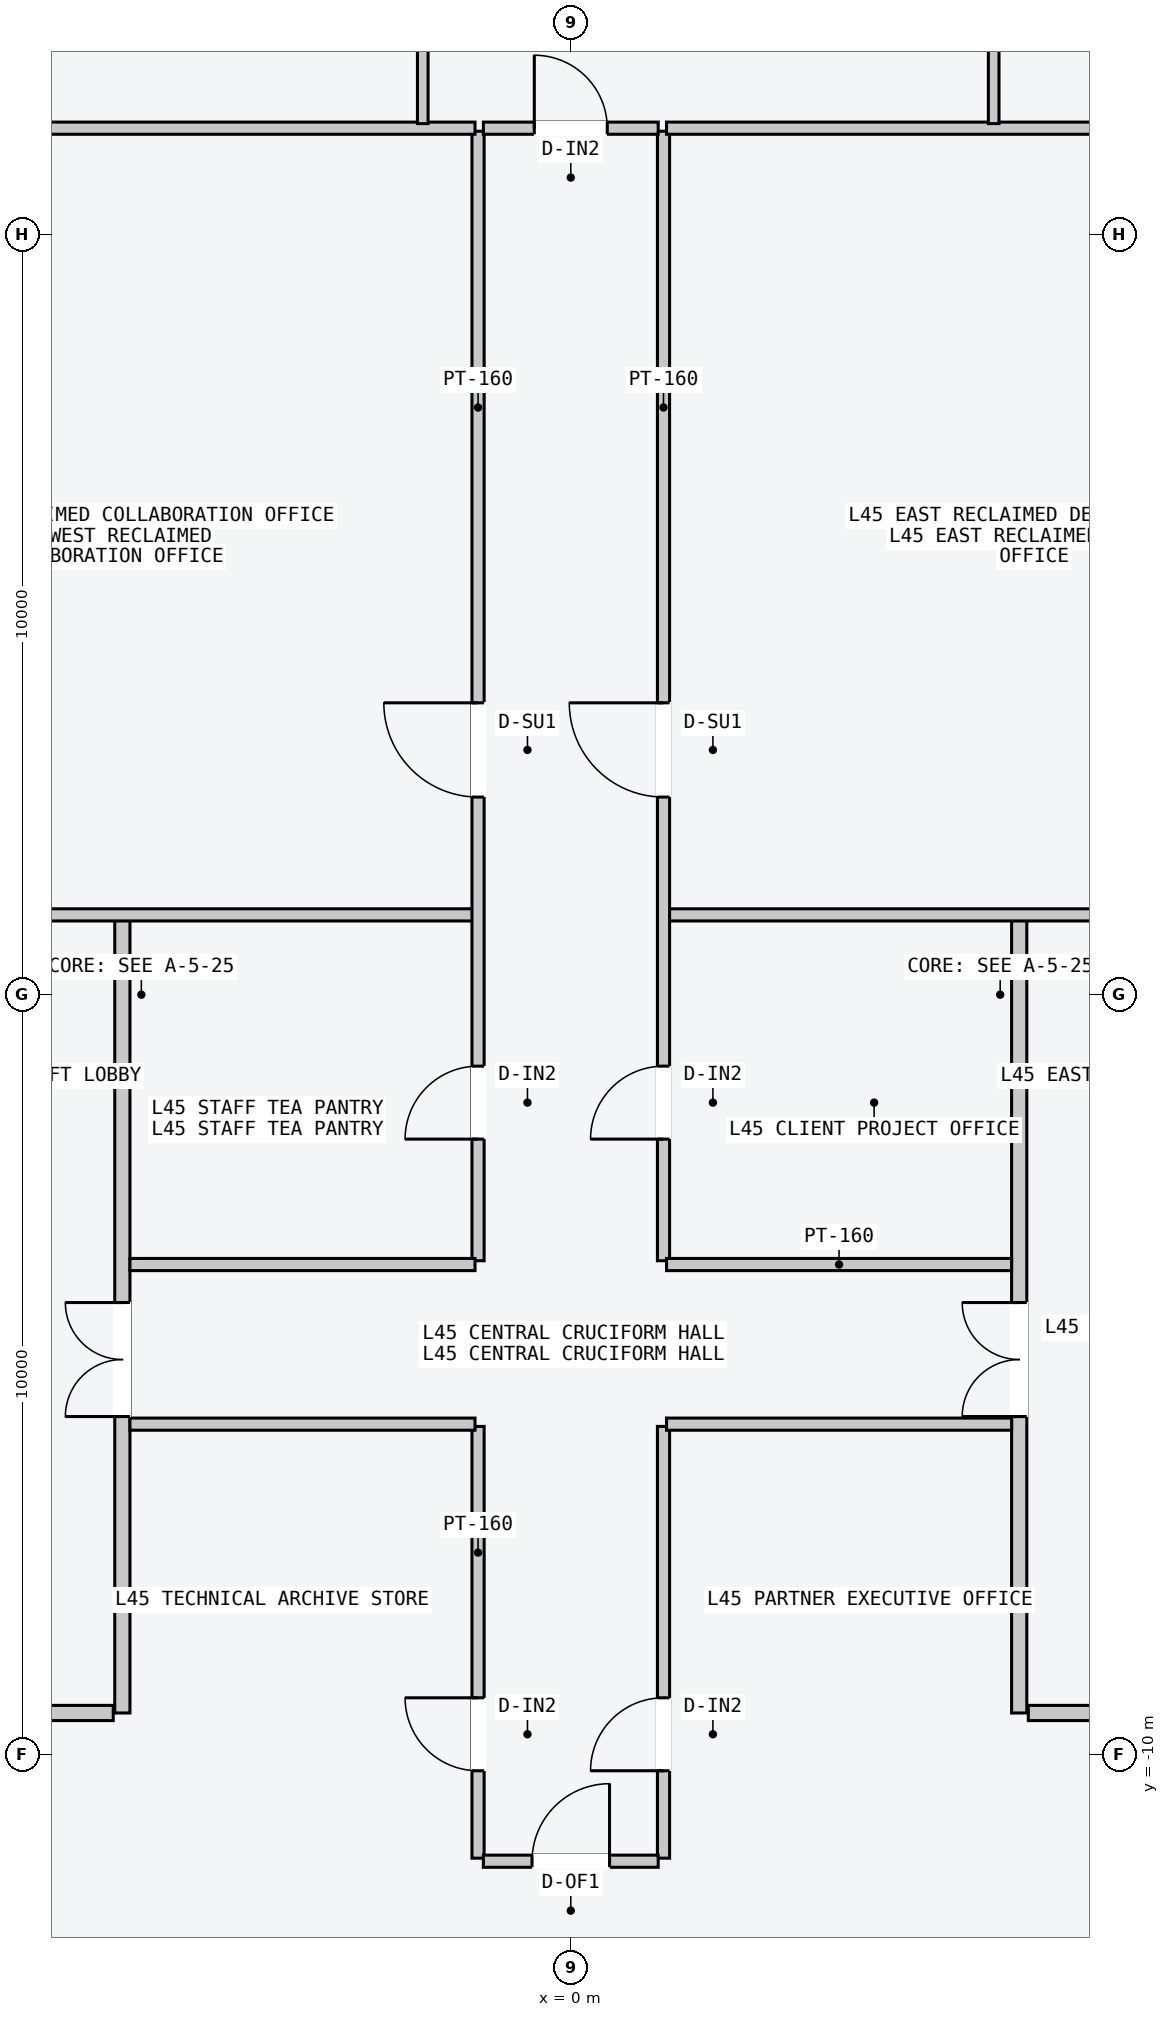
"""IFC4 building model, lengths in metres.
Left out: names, types, materials, properties, quantities, classifications, styles, units other than length and angle.
Written with IfcOpenShell. Run it as: python <this file> out.ifc"""

import sys

from ifc_helpers import new_model, si_unit, direction, frame, frame_2d, origin, place, context, subcontext, project, spatial, rectangle, extrude, element, fill, save


model = new_model("IFC4")
c1 = context("Model", 3, precision=1e-05, world=origin(), true_north=direction((0.0, 1.0)))
c2 = subcontext(c1, "Body", "Model", "MODEL_VIEW")
j1 = project(units=[si_unit("LENGTHUNIT", "METRE"), si_unit("PLANEANGLEUNIT", "RADIAN")], contexts=[c1])
p1 = place(None, origin())
s1 = spatial("IfcSite", under=j1, at=p1, CompositionType="ELEMENT")
p2 = place(p1, origin())
s2 = spatial("IfcBuilding", under=s1, at=p2, CompositionType="ELEMENT")
p3 = place(p2, frame((0.0, 0.0, 173.1)))
s3 = spatial("IfcBuildingStorey", under=s2, at=p3, CompositionType="ELEMENT", Elevation=173.1)
p4 = place(p3, frame((-5.9, -9.45, 0.0), z_axis=(0.0, 0.0, 1.0), x_axis=(0.0, 1.0, 0.0)))
e1 = element("IfcWall", 1, at=p4, inside=s3, PredefinedType="PARTITIONING", context=c2, shape_type="SweptSolid", body=[
    extrude(rectangle(XDim=10.5, YDim=0.2, at=frame_2d((5.25, 0.0))), origin(), (0.0, 0.0, 1.0), 3.4),
])
p5 = place(p4, frame((3.9, 0.0, 0.0)))
e2 = element("IfcOpeningElement", 2, at=p5, cuts=e1, PredefinedType="OPENING", context=c2, shape_type="SweptSolid", body=[
    extrude(rectangle(XDim=1.5, YDim=2.2, at=frame_2d((0.75, 1.1))), frame((0.0, 0.11, 0.0), z_axis=(0.0, -1.0, 0.0), x_axis=(1.0, 0.0, 0.0)), (0.0, 0.0, 1.0), 0.22),
])
p6 = place(p3, frame((-6.02, -9.45, 0.0), z_axis=(0.0, 0.0, 1.0), x_axis=(-1.0, 0.0, 0.0)))
e3 = element("IfcWall", 3, at=p6, inside=s3, PredefinedType="PARTITIONING", context=c2, shape_type="SweptSolid", body=[
    extrude(rectangle(XDim=1.8, YDim=0.2, at=frame_2d((0.9, 0.0))), origin(), (0.0, 0.0, 1.0), 3.4),
])
p7 = place(p3, frame((5.9, -9.45, 0.0), z_axis=(0.0, 0.0, 1.0), x_axis=(0.0, 1.0, 0.0)))
e4 = element("IfcWall", 4, at=p7, inside=s3, PredefinedType="PARTITIONING", context=c2, shape_type="SweptSolid", body=[
    extrude(rectangle(XDim=10.5, YDim=0.2, at=frame_2d((5.25, 0.0))), origin(), (0.0, 0.0, 1.0), 3.4),
])
p8 = place(p7, frame((3.9, 0.0, 0.0)))
e5 = element("IfcOpeningElement", 5, at=p8, cuts=e4, PredefinedType="OPENING", context=c2, shape_type="SweptSolid", body=[
    extrude(rectangle(XDim=1.5, YDim=2.2, at=frame_2d((0.75, 1.1))), frame((0.0, 0.11, 0.0), z_axis=(0.0, -1.0, 0.0), x_axis=(1.0, 0.0, 0.0)), (0.0, 0.0, 1.0), 0.22),
])
p9 = place(p3, frame((6.02, -9.45, 0.0), z_axis=(0.0, 0.0, 1.0), x_axis=(1.0, 0.0, 0.0)))
e6 = element("IfcWall", 6, at=p9, inside=s3, PredefinedType="PARTITIONING", context=c2, shape_type="SweptSolid", body=[
    extrude(rectangle(XDim=1.8, YDim=0.2, at=frame_2d((0.9, 0.0))), origin(), (0.0, 0.0, 1.0), 3.4),
])
p10 = place(p3, frame((-10.05, 1.05, 0.0), z_axis=(0.0, 0.0, 1.0), x_axis=(1.0, 0.0, 0.0)))
e7 = element("IfcWall", 7, at=p10, inside=s3, PredefinedType="PARTITIONING", context=c2, shape_type="SweptSolid", body=[
    extrude(rectangle(XDim=8.79, YDim=0.16, at=frame_2d((4.395, 0.0))), origin(), (0.0, 0.0, 1.0), 3.4),
])
p11 = place(p3, frame((-1.22, -3.5, 0.0), z_axis=(0.0, 0.0, 1.0), x_axis=(0.0, 1.0, 0.0)))
e8 = element("IfcWall", 8, at=p11, inside=s3, PredefinedType="PARTITIONING", context=c2, shape_type="SweptSolid", body=[
    extrude(rectangle(XDim=14.86, YDim=0.16, at=frame_2d((7.43, 0.0))), origin(), (0.0, 0.0, 1.0), 3.4),
])
p12 = place(p11, frame((6.1, 0.0, 0.0)))
e9 = element("IfcOpeningElement", 9, at=p12, cuts=e8, PredefinedType="OPENING", context=c2, shape_type="SweptSolid", body=[
    extrude(rectangle(XDim=1.24, YDim=2.24, at=frame_2d((0.62, 1.12))), frame((0.0, 0.09, 0.0), z_axis=(0.0, -1.0, 0.0), x_axis=(1.0, 0.0, 0.0)), (0.0, 0.0, 1.0), 0.18),
])
p13 = place(p11, frame((1.6, 0.0, 0.0)))
e10 = element("IfcOpeningElement", 10, at=p13, cuts=e8, PredefinedType="OPENING", context=c2, shape_type="SweptSolid", body=[
    extrude(rectangle(XDim=0.96, YDim=2.18, at=frame_2d((0.48, 1.09))), frame((0.0, 0.09, 0.0), z_axis=(0.0, -1.0, 0.0), x_axis=(1.0, 0.0, 0.0)), (0.0, 0.0, 1.0), 0.18),
])
p14 = place(p3, frame((-7.5, 11.4, 0.0), z_axis=(0.0, 0.0, 1.0), x_axis=(1.0, 0.0, 0.0)))
e11 = element("IfcWall", 11, at=p14, inside=s3, PredefinedType="PARTITIONING", context=c2, shape_type="SweptSolid", body=[
    extrude(rectangle(XDim=6.24, YDim=0.16, at=frame_2d((3.12, 0.0))), origin(), (0.0, 0.0, 1.0), 3.4),
])
p15 = place(p3, frame((-5.8, -3.55, 0.0), z_axis=(0.0, 0.0, 1.0), x_axis=(1.0, 0.0, 0.0)))
e12 = element("IfcWall", 12, at=p15, inside=s3, PredefinedType="PARTITIONING", context=c2, shape_type="SweptSolid", body=[
    extrude(rectangle(XDim=4.54, YDim=0.16, at=frame_2d((2.27, 0.0))), origin(), (0.0, 0.0, 1.0), 3.4),
])
p16 = place(p3, frame((1.26, 1.05, 0.0), z_axis=(0.0, 0.0, 1.0), x_axis=(1.0, 0.0, 0.0)))
e13 = element("IfcWall", 13, at=p16, inside=s3, PredefinedType="PARTITIONING", context=c2, shape_type="SweptSolid", body=[
    extrude(rectangle(XDim=8.8, YDim=0.16, at=frame_2d((4.4, 0.0))), origin(), (0.0, 0.0, 1.0), 3.4),
])
p17 = place(p3, frame((1.22, -3.5, 0.0), z_axis=(0.0, 0.0, 1.0), x_axis=(0.0, 1.0, 0.0)))
e14 = element("IfcWall", 14, at=p17, inside=s3, PredefinedType="PARTITIONING", context=c2, shape_type="SweptSolid", body=[
    extrude(rectangle(XDim=14.86, YDim=0.16, at=frame_2d((7.43, 0.0))), origin(), (0.0, 0.0, 1.0), 3.4),
])
p18 = place(p17, frame((6.1, 0.0, 0.0)))
e15 = element("IfcOpeningElement", 15, at=p18, cuts=e14, PredefinedType="OPENING", context=c2, shape_type="SweptSolid", body=[
    extrude(rectangle(XDim=1.24, YDim=2.24, at=frame_2d((0.62, 1.12))), frame((0.0, 0.09, 0.0), z_axis=(0.0, -1.0, 0.0), x_axis=(1.0, 0.0, 0.0)), (0.0, 0.0, 1.0), 0.18),
])
p19 = place(p17, frame((1.6, 0.0, 0.0)))
e16 = element("IfcOpeningElement", 16, at=p19, cuts=e14, PredefinedType="OPENING", context=c2, shape_type="SweptSolid", body=[
    extrude(rectangle(XDim=0.96, YDim=2.18, at=frame_2d((0.48, 1.09))), frame((0.0, 0.09, 0.0), z_axis=(0.0, -1.0, 0.0), x_axis=(1.0, 0.0, 0.0)), (0.0, 0.0, 1.0), 0.18),
])
p20 = place(p3, frame((1.26, 11.4, 0.0), z_axis=(0.0, 0.0, 1.0), x_axis=(1.0, 0.0, 0.0)))
e17 = element("IfcWall", 17, at=p20, inside=s3, PredefinedType="PARTITIONING", context=c2, shape_type="SweptSolid", body=[
    extrude(rectangle(XDim=6.24, YDim=0.16, at=frame_2d((3.12, 0.0))), origin(), (0.0, 0.0, 1.0), 3.4),
])
p21 = place(p3, frame((1.26, -3.55, 0.0), z_axis=(0.0, 0.0, 1.0), x_axis=(1.0, 0.0, 0.0)))
e18 = element("IfcWall", 18, at=p21, inside=s3, PredefinedType="PARTITIONING", context=c2, shape_type="SweptSolid", body=[
    extrude(rectangle(XDim=4.54, YDim=0.16, at=frame_2d((2.27, 0.0))), origin(), (0.0, 0.0, 1.0), 3.4),
])
p22 = place(p3, frame((-1.22, -11.36, 0.0), z_axis=(0.0, 0.0, 1.0), x_axis=(0.0, 1.0, 0.0)))
e19 = element("IfcWall", 19, at=p22, inside=s3, PredefinedType="PARTITIONING", context=c2, shape_type="SweptSolid", body=[
    extrude(rectangle(XDim=5.68, YDim=0.16, at=frame_2d((2.84, 0.0))), origin(), (0.0, 0.0, 1.0), 3.4),
])
p23 = place(p22, frame((1.15, 0.0, 0.0)))
e20 = element("IfcOpeningElement", 20, at=p23, cuts=e19, PredefinedType="OPENING", context=c2, shape_type="SweptSolid", body=[
    extrude(rectangle(XDim=0.96, YDim=2.18, at=frame_2d((0.48, 1.09))), frame((0.0, 0.09, 0.0), z_axis=(0.0, -1.0, 0.0), x_axis=(1.0, 0.0, 0.0)), (0.0, 0.0, 1.0), 0.18),
])
p24 = place(p3, frame((1.22, -11.36, 0.0), z_axis=(0.0, 0.0, 1.0), x_axis=(0.0, 1.0, 0.0)))
e21 = element("IfcWall", 21, at=p24, inside=s3, PredefinedType="PARTITIONING", context=c2, shape_type="SweptSolid", body=[
    extrude(rectangle(XDim=5.68, YDim=0.16, at=frame_2d((2.84, 0.0))), origin(), (0.0, 0.0, 1.0), 3.4),
])
p25 = place(p24, frame((1.15, 0.0, 0.0)))
e22 = element("IfcOpeningElement", 22, at=p25, cuts=e21, PredefinedType="OPENING", context=c2, shape_type="SweptSolid", body=[
    extrude(rectangle(XDim=0.96, YDim=2.18, at=frame_2d((0.48, 1.09))), frame((0.0, 0.09, 0.0), z_axis=(0.0, -1.0, 0.0), x_axis=(1.0, 0.0, 0.0)), (0.0, 0.0, 1.0), 0.18),
])
for number, where, z_axis, x_axis in (
    (23, (-5.8, -5.65, 0.0), (0.0, 0.0, 1.0), (1.0, 0.0, 0.0)),
    (24, (1.26, -5.65, 0.0), (0.0, 0.0, 1.0), (1.0, 0.0, 0.0)),
):
    element("IfcWall", number, at=place(p3, frame(where, z_axis=z_axis, x_axis=x_axis)), inside=s3, PredefinedType="PARTITIONING", context=c2, shape_type="SweptSolid", body=[
        extrude(rectangle(XDim=4.54, YDim=0.16, at=frame_2d((2.27, 0.0))), origin(), (0.0, 0.0, 1.0), 3.4),
    ])
p26 = place(p3, frame((-1.948, 11.46, 0.0), z_axis=(0.0, 0.0, 1.0), x_axis=(0.0, 1.0, 0.0)))
e25 = element("IfcWall", 25, at=p26, inside=s3, PredefinedType="PARTITIONING", context=c2, shape_type="SweptSolid", body=[
    extrude(rectangle(XDim=7.1, YDim=0.14, at=frame_2d((3.55, 0.0))), origin(), (0.0, 0.0, 1.0), 3.4),
])
p27 = place(p26, frame((1.15, 0.0, 0.0)))
e26 = element("IfcOpeningElement", 26, at=p27, cuts=e25, PredefinedType="OPENING", context=c2, shape_type="SweptSolid", body=[
    extrude(rectangle(XDim=0.96, YDim=2.18, at=frame_2d((0.48, 1.09))), frame((0.0, 0.08, 0.0), z_axis=(0.0, -1.0, 0.0), x_axis=(1.0, 0.0, 0.0)), (0.0, 0.0, 1.0), 0.16),
])
p28 = place(p3, frame((5.564, 11.46, 0.0), z_axis=(0.0, 0.0, 1.0), x_axis=(0.0, 1.0, 0.0)))
e27 = element("IfcWall", 27, at=p28, inside=s3, PredefinedType="PARTITIONING", context=c2, shape_type="SweptSolid", body=[
    extrude(rectangle(XDim=7.1, YDim=0.14, at=frame_2d((3.55, 0.0))), origin(), (0.0, 0.0, 1.0), 3.4),
])
p29 = place(p28, frame((1.15, 0.0, 0.0)))
e28 = element("IfcOpeningElement", 28, at=p29, cuts=e27, PredefinedType="OPENING", context=c2, shape_type="SweptSolid", body=[
    extrude(rectangle(XDim=0.96, YDim=2.18, at=frame_2d((0.48, 1.09))), frame((0.0, 0.08, 0.0), z_axis=(0.0, -1.0, 0.0), x_axis=(1.0, 0.0, 0.0)), (0.0, 0.0, 1.0), 0.16),
])
p30 = place(p3, frame((-1.15, 11.4, 0.0), z_axis=(0.0, 0.0, 1.0), x_axis=(1.0, 0.0, 0.0)))
e29 = element("IfcWall", 29, at=p30, inside=s3, PredefinedType="PARTITIONING", context=c2, shape_type="SweptSolid", body=[
    extrude(rectangle(XDim=2.3, YDim=0.16, at=frame_2d((1.15, 0.0))), origin(), (0.0, 0.0, 1.0), 3.4),
])
p31 = place(p30, frame((0.67, 0.0, 0.0)))
e30 = element("IfcOpeningElement", 30, at=p31, cuts=e29, PredefinedType="OPENING", context=c2, shape_type="SweptSolid", body=[
    extrude(rectangle(XDim=0.96, YDim=2.18, at=frame_2d((0.48, 1.09))), frame((0.0, 0.09, 0.0), z_axis=(0.0, -1.0, 0.0), x_axis=(1.0, 0.0, 0.0)), (0.0, 0.0, 1.0), 0.18),
])
p32 = place(p3, frame((-1.15, -11.4, 0.0), z_axis=(0.0, 0.0, 1.0), x_axis=(1.0, 0.0, 0.0)))
e31 = element("IfcWall", 31, at=p32, inside=s3, PredefinedType="PARTITIONING", context=c2, shape_type="SweptSolid", body=[
    extrude(rectangle(XDim=2.3, YDim=0.16, at=frame_2d((1.15, 0.0))), origin(), (0.0, 0.0, 1.0), 3.4),
])
p33 = place(p32, frame((0.64, 0.0, 0.0)))
e32 = element("IfcOpeningElement", 32, at=p33, cuts=e31, PredefinedType="OPENING", context=c2, shape_type="SweptSolid", body=[
    extrude(rectangle(XDim=1.02, YDim=2.2, at=frame_2d((0.51, 1.1))), frame((0.0, 0.09, 0.0), z_axis=(0.0, -1.0, 0.0), x_axis=(1.0, 0.0, 0.0)), (0.0, 0.0, 1.0), 0.18),
])
p34 = place(p5, origin())
e33 = element("IfcDoor", 33, at=p34, inside=s3, OperationType="DOUBLE_DOOR_SINGLE_SWING", PredefinedType="DOOR", context=c2, shape_type="SweptSolid", body=[
    extrude(rectangle(XDim=1.5, YDim=2.2, at=frame_2d((0.75, 1.1))), frame((0.0, 0.025, 0.0), z_axis=(0.0, -1.0, 0.0), x_axis=(1.0, 0.0, 0.0)), (0.0, 0.0, 1.0), 0.05),
])
fill(e2, e33)
p35 = place(p8, origin())
e34 = element("IfcDoor", 34, at=p35, inside=s3, OperationType="DOUBLE_DOOR_SINGLE_SWING", PredefinedType="DOOR", context=c2, shape_type="SweptSolid", body=[
    extrude(rectangle(XDim=1.5, YDim=2.2, at=frame_2d((0.75, 1.1))), frame((0.0, 0.025, 0.0), z_axis=(0.0, -1.0, 0.0), x_axis=(1.0, 0.0, 0.0)), (0.0, 0.0, 1.0), 0.05),
])
fill(e5, e34)
p36 = place(p12, origin())
e35 = element("IfcDoor", 35, at=p36, inside=s3, OperationType="SINGLE_SWING_RIGHT", PredefinedType="DOOR", context=c2, shape_type="SweptSolid", body=[
    extrude(rectangle(XDim=1.24, YDim=2.24, at=frame_2d((0.62, 1.12))), frame((0.0, 0.025, 0.0), z_axis=(0.0, -1.0, 0.0), x_axis=(1.0, 0.0, 0.0)), (0.0, 0.0, 1.0), 0.05),
])
fill(e9, e35)
p37 = place(p13, origin())
e36 = element("IfcDoor", 36, at=p37, inside=s3, OperationType="SINGLE_SWING_LEFT", PredefinedType="DOOR", context=c2, shape_type="SweptSolid", body=[
    extrude(rectangle(XDim=0.96, YDim=2.18, at=frame_2d((0.48, 1.09))), frame((0.0, 0.025, 0.0), z_axis=(0.0, -1.0, 0.0), x_axis=(1.0, 0.0, 0.0)), (0.0, 0.0, 1.0), 0.05),
])
fill(e10, e36)
p38 = place(p18, origin())
e37 = element("IfcDoor", 37, at=p38, inside=s3, OperationType="SINGLE_SWING_RIGHT", PredefinedType="DOOR", context=c2, shape_type="SweptSolid", body=[
    extrude(rectangle(XDim=1.24, YDim=2.24, at=frame_2d((0.62, 1.12))), frame((0.0, 0.025, 0.0), z_axis=(0.0, -1.0, 0.0), x_axis=(1.0, 0.0, 0.0)), (0.0, 0.0, 1.0), 0.05),
])
fill(e15, e37)
p39 = place(p19, origin())
e38 = element("IfcDoor", 38, at=p39, inside=s3, OperationType="SINGLE_SWING_LEFT", PredefinedType="DOOR", context=c2, shape_type="SweptSolid", body=[
    extrude(rectangle(XDim=0.96, YDim=2.18, at=frame_2d((0.48, 1.09))), frame((0.0, 0.025, 0.0), z_axis=(0.0, -1.0, 0.0), x_axis=(1.0, 0.0, 0.0)), (0.0, 0.0, 1.0), 0.05),
])
fill(e16, e38)
p40 = place(p23, origin())
e39 = element("IfcDoor", 39, at=p40, inside=s3, OperationType="SINGLE_SWING_RIGHT", PredefinedType="DOOR", context=c2, shape_type="SweptSolid", body=[
    extrude(rectangle(XDim=0.96, YDim=2.18, at=frame_2d((0.48, 1.09))), frame((0.0, 0.025, 0.0), z_axis=(0.0, -1.0, 0.0), x_axis=(1.0, 0.0, 0.0)), (0.0, 0.0, 1.0), 0.05),
])
fill(e20, e39)
p41 = place(p25, origin())
e40 = element("IfcDoor", 40, at=p41, inside=s3, OperationType="SINGLE_SWING_LEFT", PredefinedType="DOOR", context=c2, shape_type="SweptSolid", body=[
    extrude(rectangle(XDim=0.96, YDim=2.18, at=frame_2d((0.48, 1.09))), frame((0.0, 0.025, 0.0), z_axis=(0.0, -1.0, 0.0), x_axis=(1.0, 0.0, 0.0)), (0.0, 0.0, 1.0), 0.05),
])
fill(e22, e40)
p42 = place(p31, origin())
e41 = element("IfcDoor", 41, at=p42, inside=s3, OperationType="SINGLE_SWING_LEFT", PredefinedType="DOOR", context=c2, shape_type="SweptSolid", body=[
    extrude(rectangle(XDim=0.96, YDim=2.18, at=frame_2d((0.48, 1.09))), frame((0.0, 0.025, 0.0), z_axis=(0.0, -1.0, 0.0), x_axis=(1.0, 0.0, 0.0)), (0.0, 0.0, 1.0), 0.05),
])
fill(e30, e41)
p43 = place(p33, origin())
e42 = element("IfcDoor", 42, at=p43, inside=s3, OperationType="SINGLE_SWING_RIGHT", PredefinedType="DOOR", context=c2, shape_type="SweptSolid", body=[
    extrude(rectangle(XDim=1.02, YDim=2.2, at=frame_2d((0.51, 1.1))), frame((0.0, 0.025, 0.0), z_axis=(0.0, -1.0, 0.0), x_axis=(1.0, 0.0, 0.0)), (0.0, 0.0, 1.0), 0.05),
])
fill(e32, e42)
save(model, sys.argv[1])
